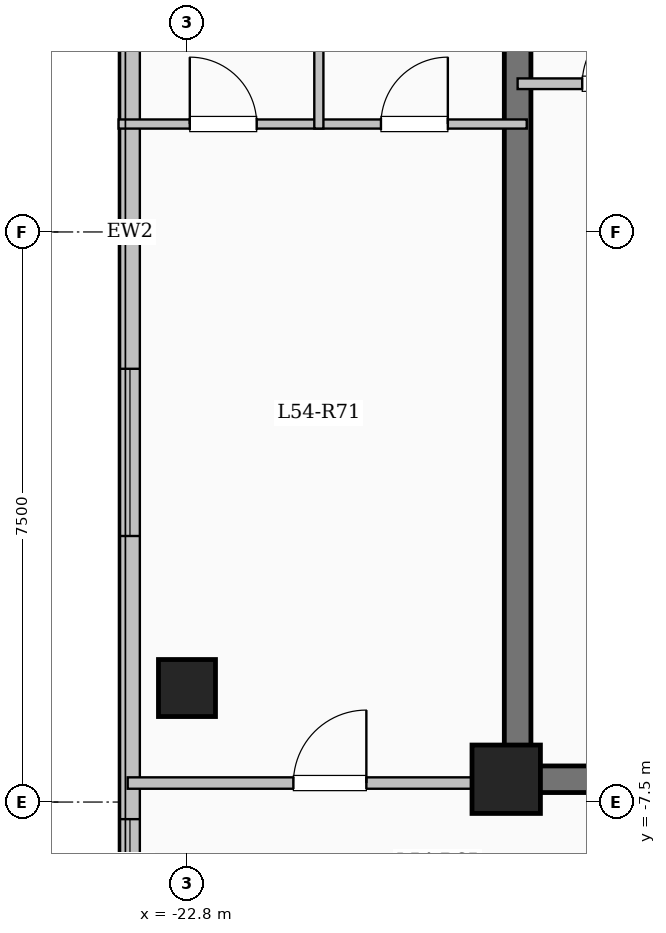
"""IFC4 building model, lengths in metres.
Left out: names, types, materials, properties, quantities, classifications, styles, units other than length and angle.
Written with IfcOpenShell. Run it as: python <this file> out.ifc"""

import sys

from ifc_helpers import new_model, si_unit, direction, frame, frame_2d, origin, origin_2d, place, context, subcontext, project, spatial, rectangle, extrude, element, fill, save


model = new_model("IFC4")
c1 = context("Model", 3, precision=1e-05, world=origin(), true_north=direction((0.0, 1.0)))
c2 = subcontext(c1, "Body", "Model", "MODEL_VIEW")
j1 = project(units=[si_unit("LENGTHUNIT", "METRE"), si_unit("PLANEANGLEUNIT", "RADIAN")], contexts=[c1])
p1 = place(None, origin())
s1 = spatial("IfcSite", under=j1, at=p1, CompositionType="ELEMENT")
p2 = place(p1, origin())
s2 = spatial("IfcBuilding", under=s1, at=p2, CompositionType="ELEMENT")
p3 = place(p2, frame((0.0, 0.0, 200.3)))
s3 = spatial("IfcBuildingStorey", under=s2, at=p3, CompositionType="ELEMENT", Elevation=200.3)
p4 = place(p3, frame((-18.6, -7.2, 0.0), z_axis=(0.0, 0.0, 1.0), x_axis=(1.0, 0.0, 0.0)))
e1 = element("IfcColumn", 1, at=p4, inside=s3, PredefinedType="COLUMN", context=c2, shape_type="SweptSolid", body=[
    extrude(rectangle(XDim=0.9, YDim=0.9, at=origin_2d()), origin(), (0.0, 0.0, 1.0), 3.35),
])
p5 = place(p3, frame((-22.8, -6.0, 0.0), z_axis=(0.0, 0.0, 1.0), x_axis=(1.0, 0.0, 0.0)))
e2 = element("IfcColumn", 2, at=p5, inside=s3, PredefinedType="COLUMN", context=c2, shape_type="SweptSolid", body=[
    extrude(rectangle(XDim=0.75, YDim=0.75, at=origin_2d()), origin(), (0.0, 0.0, 1.0), 3.35),
])
p6 = place(p3, frame((-23.55, -17.25, 0.0), z_axis=(0.0, 0.0, 1.0), x_axis=(0.0, 1.0, 0.0)))
e3 = element("IfcWall", 3, at=p6, inside=s3, PredefinedType="SOLIDWALL", context=c2, shape_type="SweptSolid", body=[
    extrude(rectangle(XDim=34.5, YDim=0.26, at=frame_2d((17.25, 0.0))), origin(), (0.0, 0.0, 1.0), 3.1),
])
p7 = place(p6, frame((2.825, 0.0, 0.9)))
e4 = element("IfcOpeningElement", 4, at=p7, cuts=e3, PredefinedType="OPENING", context=c2, shape_type="SweptSolid", body=[
    extrude(rectangle(XDim=2.2, YDim=1.75, at=frame_2d((1.1, 0.875))), frame((0.0, 0.14, 0.0), z_axis=(0.0, -1.0, 0.0), x_axis=(1.0, 0.0, 0.0)), (0.0, 0.0, 1.0), 0.28),
])
p8 = place(p6, frame((8.325, 0.0, 0.95)))
e5 = element("IfcOpeningElement", 5, at=p8, cuts=e3, PredefinedType="OPENING", context=c2, shape_type="SweptSolid", body=[
    extrude(rectangle(XDim=1.2, YDim=1.5, at=frame_2d((0.6, 0.75))), frame((0.0, 0.14, 0.0), z_axis=(0.0, -1.0, 0.0), x_axis=(1.0, 0.0, 0.0)), (0.0, 0.0, 1.0), 0.28),
])
p9 = place(p6, frame((13.25, 0.0, 0.9)))
e6 = element("IfcOpeningElement", 6, at=p9, cuts=e3, PredefinedType="OPENING", context=c2, shape_type="SweptSolid", body=[
    extrude(rectangle(XDim=2.2, YDim=1.75, at=frame_2d((1.1, 0.875))), frame((0.0, 0.14, 0.0), z_axis=(0.0, -1.0, 0.0), x_axis=(1.0, 0.0, 0.0)), (0.0, 0.0, 1.0), 0.28),
])
p10 = place(p6, frame((19.65, 0.0, 0.9)))
e7 = element("IfcOpeningElement", 7, at=p10, cuts=e3, PredefinedType="OPENING", context=c2, shape_type="SweptSolid", body=[
    extrude(rectangle(XDim=1.65, YDim=1.6, at=frame_2d((0.825, 0.8))), frame((0.0, 0.14, 0.0), z_axis=(0.0, -1.0, 0.0), x_axis=(1.0, 0.0, 0.0)), (0.0, 0.0, 1.0), 0.28),
])
p11 = place(p6, frame((24.125, 0.0, 0.9)))
e8 = element("IfcOpeningElement", 8, at=p11, cuts=e3, PredefinedType="OPENING", context=c2, shape_type="SweptSolid", body=[
    extrude(rectangle(XDim=2.0, YDim=1.7, at=frame_2d((1.0, 0.85))), frame((0.0, 0.14, 0.0), z_axis=(0.0, -1.0, 0.0), x_axis=(1.0, 0.0, 0.0)), (0.0, 0.0, 1.0), 0.28),
])
p12 = place(p6, frame((28.375, 0.0, 0.95)))
e9 = element("IfcOpeningElement", 9, at=p12, cuts=e3, PredefinedType="OPENING", context=c2, shape_type="SweptSolid", body=[
    extrude(rectangle(XDim=1.0, YDim=1.5, at=frame_2d((0.5, 0.75))), frame((0.0, 0.14, 0.0), z_axis=(0.0, -1.0, 0.0), x_axis=(1.0, 0.0, 0.0)), (0.0, 0.0, 1.0), 0.28),
])
p13 = place(p6, frame((31.125, 0.0, 0.9)))
e10 = element("IfcOpeningElement", 10, at=p13, cuts=e3, PredefinedType="OPENING", context=c2, shape_type="SweptSolid", body=[
    extrude(rectangle(XDim=2.0, YDim=1.7, at=frame_2d((1.0, 0.85))), frame((0.0, 0.14, 0.0), z_axis=(0.0, -1.0, 0.0), x_axis=(1.0, 0.0, 0.0)), (0.0, 0.0, 1.0), 0.28),
])
p14 = place(p3, frame((-18.45, -7.375, 0.0), z_axis=(0.0, 0.0, 1.0), x_axis=(0.0, 1.0, 0.0)))
e11 = element("IfcWall", 11, at=p14, inside=s3, PredefinedType="SHEAR", context=c2, shape_type="SweptSolid", body=[
    extrude(rectangle(XDim=14.05, YDim=0.35, at=frame_2d((7.025, 0.0))), origin(), (0.0, 0.0, 1.0), 3.35),
])
p15 = place(p3, frame((-18.625, -7.2, 0.0), z_axis=(0.0, 0.0, 1.0), x_axis=(1.0, 0.0, 0.0)))
e12 = element("IfcWall", 12, at=p15, inside=s3, PredefinedType="SHEAR", context=c2, shape_type="SweptSolid", body=[
    extrude(rectangle(XDim=6.0, YDim=0.35, at=frame_2d((3.0, 0.0))), origin(), (0.0, 0.0, 1.0), 3.35),
])
p16 = place(p15, frame((1.725, 0.0, 0.0)))
e13 = element("IfcOpeningElement", 13, at=p16, cuts=e12, PredefinedType="OPENING", context=c2, shape_type="SweptSolid", body=[
    extrude(rectangle(XDim=1.12, YDim=2.15, at=frame_2d((0.56, 1.075))), frame((0.0, 0.185, 0.0), z_axis=(0.0, -1.0, 0.0), x_axis=(1.0, 0.0, 0.0)), (0.0, 0.0, 1.0), 0.37),
])
p17 = place(p3, frame((-18.45, 1.95, 0.0), z_axis=(0.0, 0.0, 1.0), x_axis=(1.0, 0.0, 0.0)))
e14 = element("IfcWall", 14, at=p17, inside=s3, PredefinedType="PARTITIONING", context=c2, shape_type="SweptSolid", body=[
    extrude(rectangle(XDim=3.15, YDim=0.14, at=frame_2d((1.575, 0.0))), origin(), (0.0, 0.0, 1.0), 3.1),
])
p18 = place(p17, frame((0.85, 0.0, 0.0)))
e15 = element("IfcOpeningElement", 15, at=p18, cuts=e14, PredefinedType="OPENING", context=c2, shape_type="SweptSolid", body=[
    extrude(rectangle(XDim=0.9, YDim=2.08, at=frame_2d((0.45, 1.04))), frame((0.0, 0.08, 0.0), z_axis=(0.0, -1.0, 0.0), x_axis=(1.0, 0.0, 0.0)), (0.0, 0.0, 1.0), 0.16),
])
p19 = place(p3, frame((-23.58, -7.25, 0.0), z_axis=(0.0, 0.0, 1.0), x_axis=(1.0, 0.0, 0.0)))
e16 = element("IfcWall", 16, at=p19, inside=s3, PredefinedType="PARTITIONING", context=c2, shape_type="SweptSolid", body=[
    extrude(rectangle(XDim=5.13, YDim=0.15, at=frame_2d((2.565, 0.0))), origin(), (0.0, 0.0, 1.0), 3.1),
])
p20 = place(p19, frame((2.18, 0.0, 0.0)))
e17 = element("IfcOpeningElement", 17, at=p20, cuts=e16, PredefinedType="OPENING", context=c2, shape_type="SweptSolid", body=[
    extrude(rectangle(XDim=0.96, YDim=2.15, at=frame_2d((0.48, 1.075))), frame((0.0, 0.085, 0.0), z_axis=(0.0, -1.0, 0.0), x_axis=(1.0, 0.0, 0.0)), (0.0, 0.0, 1.0), 0.17),
])
p21 = place(p3, frame((-23.7, 1.42, 0.0), z_axis=(0.0, 0.0, 1.0), x_axis=(1.0, 0.0, 0.0)))
e18 = element("IfcWall", 18, at=p21, inside=s3, PredefinedType="PARTITIONING", context=c2, shape_type="SweptSolid", body=[
    extrude(rectangle(XDim=5.37, YDim=0.12, at=frame_2d((2.685, 0.0))), origin(), (0.0, 0.0, 1.0), 3.1),
])
p22 = place(p21, frame((0.937, 0.0, 0.0)))
e19 = element("IfcOpeningElement", 19, at=p22, cuts=e18, PredefinedType="OPENING", context=c2, shape_type="SweptSolid", body=[
    extrude(rectangle(XDim=0.88, YDim=2.1, at=frame_2d((0.44, 1.05))), frame((0.0, 0.07, 0.0), z_axis=(0.0, -1.0, 0.0), x_axis=(1.0, 0.0, 0.0)), (0.0, 0.0, 1.0), 0.14),
])
p23 = place(p21, frame((3.452, 0.0, 0.0)))
e20 = element("IfcOpeningElement", 20, at=p23, cuts=e18, PredefinedType="OPENING", context=c2, shape_type="SweptSolid", body=[
    extrude(rectangle(XDim=0.88, YDim=2.1, at=frame_2d((0.44, 1.05))), frame((0.0, 0.07, 0.0), z_axis=(0.0, -1.0, 0.0), x_axis=(1.0, 0.0, 0.0)), (0.0, 0.0, 1.0), 0.14),
])
p24 = place(p3, frame((-21.065, 1.36, 0.0), z_axis=(0.0, 0.0, 1.0), x_axis=(0.0, 1.0, 0.0)))
e21 = element("IfcWall", 21, at=p24, inside=s3, PredefinedType="PARTITIONING", context=c2, shape_type="SweptSolid", body=[
    extrude(rectangle(XDim=3.58, YDim=0.12, at=frame_2d((1.79, 0.0))), origin(), (0.0, 0.0, 1.0), 3.1),
])
p25 = place(p8, origin())
e22 = element("IfcWindow", 22, at=p25, inside=s3, PartitioningType="SINGLE_PANEL", PredefinedType="WINDOW", context=c2, shape_type="SweptSolid", body=[
    extrude(rectangle(XDim=1.2, YDim=1.5, at=frame_2d((0.6, 0.75))), frame((0.0, 0.03, 0.0), z_axis=(0.0, -1.0, 0.0), x_axis=(1.0, 0.0, 0.0)), (0.0, 0.0, 1.0), 0.06),
])
fill(e5, e22)
p26 = place(p9, origin())
e23 = element("IfcWindow", 23, at=p26, inside=s3, PartitioningType="SINGLE_PANEL", PredefinedType="WINDOW", context=c2, shape_type="SweptSolid", body=[
    extrude(rectangle(XDim=2.2, YDim=1.75, at=frame_2d((1.1, 0.875))), frame((0.0, 0.03, 0.0), z_axis=(0.0, -1.0, 0.0), x_axis=(1.0, 0.0, 0.0)), (0.0, 0.0, 1.0), 0.06),
])
fill(e6, e23)
p27 = place(p18, origin())
e24 = element("IfcDoor", 24, at=p27, inside=s3, OperationType="SINGLE_SWING_RIGHT", PredefinedType="DOOR", context=c2, shape_type="SweptSolid", body=[
    extrude(rectangle(XDim=0.9, YDim=2.08, at=frame_2d((0.45, 1.04))), frame((0.0, 0.025, 0.0), z_axis=(0.0, -1.0, 0.0), x_axis=(1.0, 0.0, 0.0)), (0.0, 0.0, 1.0), 0.05),
])
fill(e15, e24)
p28 = place(p20, origin())
e25 = element("IfcDoor", 25, at=p28, inside=s3, OperationType="SINGLE_SWING_RIGHT", PredefinedType="DOOR", context=c2, shape_type="SweptSolid", body=[
    extrude(rectangle(XDim=0.96, YDim=2.15, at=frame_2d((0.48, 1.075))), frame((0.0, 0.025, 0.0), z_axis=(0.0, -1.0, 0.0), x_axis=(1.0, 0.0, 0.0)), (0.0, 0.0, 1.0), 0.05),
])
fill(e17, e25)
p29 = place(p22, origin())
e26 = element("IfcDoor", 26, at=p29, inside=s3, OperationType="SINGLE_SWING_LEFT", PredefinedType="DOOR", context=c2, shape_type="SweptSolid", body=[
    extrude(rectangle(XDim=0.88, YDim=2.1, at=frame_2d((0.44, 1.05))), frame((0.0, 0.025, 0.0), z_axis=(0.0, -1.0, 0.0), x_axis=(1.0, 0.0, 0.0)), (0.0, 0.0, 1.0), 0.05),
])
fill(e19, e26)
p30 = place(p23, origin())
e27 = element("IfcDoor", 27, at=p30, inside=s3, OperationType="SINGLE_SWING_RIGHT", PredefinedType="DOOR", context=c2, shape_type="SweptSolid", body=[
    extrude(rectangle(XDim=0.88, YDim=2.1, at=frame_2d((0.44, 1.05))), frame((0.0, 0.025, 0.0), z_axis=(0.0, -1.0, 0.0), x_axis=(1.0, 0.0, 0.0)), (0.0, 0.0, 1.0), 0.05),
])
fill(e20, e27)
save(model, sys.argv[1])
